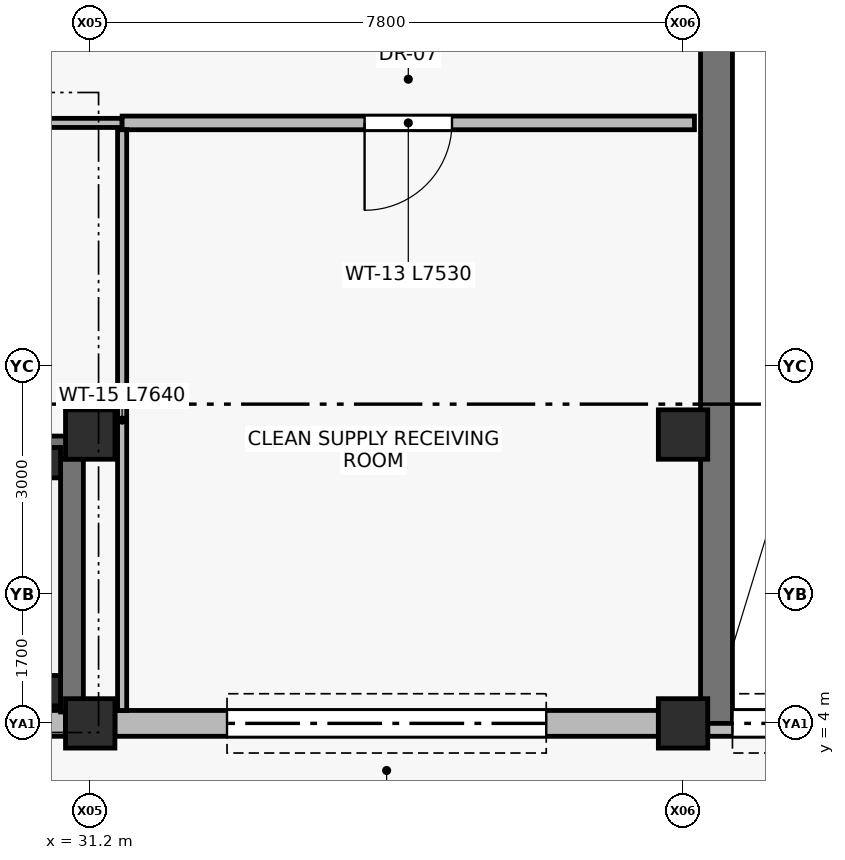
"""IFC4 building model, lengths in metres.
Left out: names, types, materials, properties, quantities, classifications, styles, units other than length and angle.
Written with IfcOpenShell. Run it as: python <this file> out.ifc"""

import sys

from ifc_helpers import new_model, si_unit, direction, frame, frame_2d, origin, origin_2d, place, context, subcontext, project, spatial, rectangle, extrude, element, fill, save


model = new_model("IFC4")
c1 = context("Model", 3, precision=1e-05, world=origin(), true_north=direction((0.0, 1.0)))
c2 = subcontext(c1, "Body", "Model", "MODEL_VIEW")
j1 = project(units=[si_unit("LENGTHUNIT", "METRE"), si_unit("PLANEANGLEUNIT", "RADIAN")], contexts=[c1])
p1 = place(None, origin())
s1 = spatial("IfcSite", under=j1, at=p1, CompositionType="ELEMENT")
p2 = place(p1, origin())
s2 = spatial("IfcBuilding", under=s1, at=p2, CompositionType="ELEMENT")
p3 = place(p2, origin())
s3 = spatial("IfcBuildingStorey", under=s2, at=p3, CompositionType="ELEMENT", Elevation=0.0)
for number, where, z_axis, x_axis in (
    (1, (31.2, 4.0, 0.0), (0.0, 0.0, 1.0), (1.0, 0.0, 0.0)),
    (2, (31.2, 7.8, 0.0), (0.0, 0.0, 1.0), (1.0, 0.0, 0.0)),
    (3, (39.0, 4.0, 0.0), (0.0, 0.0, 1.0), (1.0, 0.0, 0.0)),
    (4, (39.0, 7.8, 0.0), (0.0, 0.0, 1.0), (1.0, 0.0, 0.0)),
):
    element("IfcColumn", number, at=place(p3, frame(where, z_axis=z_axis, x_axis=x_axis)), inside=s3, PredefinedType="COLUMN", context=c2, shape_type="SweptSolid", body=[
        extrude(rectangle(XDim=0.65, YDim=0.65, at=origin_2d()), origin(), (0.0, 0.0, 1.0), 4.8),
    ])
for number, where, z_axis, x_axis in (
    (5, (30.61, 4.43, 0.0), (0.0, 0.0, 1.0), (1.0, 0.0, 0.0)),
    (6, (30.61, 7.43, 0.0), (0.0, 0.0, 1.0), (1.0, 0.0, 0.0)),
):
    element("IfcColumn", number, at=place(p3, frame(where, z_axis=z_axis, x_axis=x_axis)), inside=s3, PredefinedType="COLUMN", context=c2, shape_type="SweptSolid", body=[
        extrude(rectangle(XDim=0.4, YDim=0.4, at=origin_2d()), origin(), (0.0, 0.0, 1.0), 4.8),
    ])
p4 = place(p3, frame((30.875, 4.0, 0.0), z_axis=(0.0, 0.0, 1.0), x_axis=(-1.0, 0.0, 0.0)))
e7 = element("IfcWall", 7, at=p4, inside=s3, PredefinedType="STANDARD", context=c2, shape_type="SweptSolid", body=[
    extrude(rectangle(XDim=7.15, YDim=0.34, at=frame_2d((3.575, 0.0))), origin(), (0.0, 0.0, 1.0), 4.04),
])
p5 = place(p4, frame((5.23, 0.0, 0.0)))
e8 = element("IfcOpeningElement", 8, at=p5, cuts=e7, PredefinedType="OPENING", context=c2, shape_type="SweptSolid", body=[
    extrude(rectangle(XDim=1.8, YDim=2.25, at=frame_2d((0.9, 1.125))), frame((0.0, 0.18, 0.0), z_axis=(0.0, -1.0, 0.0), x_axis=(1.0, 0.0, 0.0)), (0.0, 0.0, 1.0), 0.36),
])
p6 = place(p3, frame((38.675, 4.0, 0.0), z_axis=(0.0, 0.0, 1.0), x_axis=(-1.0, 0.0, 0.0)))
e9 = element("IfcWall", 9, at=p6, inside=s3, PredefinedType="STANDARD", context=c2, shape_type="SweptSolid", body=[
    extrude(rectangle(XDim=7.15, YDim=0.34, at=frame_2d((3.575, 0.0))), origin(), (0.0, 0.0, 1.0), 3.35),
])
p7 = place(p6, frame((1.475, 0.0, 0.0)))
e10 = element("IfcOpeningElement", 10, at=p7, cuts=e9, PredefinedType="OPENING", context=c2, shape_type="SweptSolid", body=[
    extrude(rectangle(XDim=4.2, YDim=3.1, at=frame_2d((2.1, 1.55))), frame((0.0, 0.18, 0.0), z_axis=(0.0, -1.0, 0.0), x_axis=(1.0, 0.0, 0.0)), (0.0, 0.0, 1.0), 0.36),
])
p8 = place(p3, frame((46.475, 4.0, 0.0), z_axis=(0.0, 0.0, 1.0), x_axis=(-1.0, 0.0, 0.0)))
e11 = element("IfcWall", 11, at=p8, inside=s3, PredefinedType="STANDARD", context=c2, shape_type="SweptSolid", body=[
    extrude(rectangle(XDim=7.15, YDim=0.34, at=frame_2d((3.575, 0.0))), origin(), (0.0, 0.0, 1.0), 3.35),
])
p9 = place(p8, frame((0.325, 0.0, 0.0)))
e12 = element("IfcOpeningElement", 12, at=p9, cuts=e11, PredefinedType="OPENING", context=c2, shape_type="SweptSolid", body=[
    extrude(rectangle(XDim=6.5, YDim=3.2, at=frame_2d((3.25, 1.6))), frame((0.0, 0.18, 0.0), z_axis=(0.0, -1.0, 0.0), x_axis=(1.0, 0.0, 0.0)), (0.0, 0.0, 1.0), 0.36),
])
p10 = place(p3, frame((31.11, 7.63, 0.0), z_axis=(0.0, 0.0, 1.0), x_axis=(-1.0, 0.0, 0.0)))
e13 = element("IfcWall", 13, at=p10, inside=s3, PredefinedType="SHEAR", context=c2, shape_type="SweptSolid", body=[
    extrude(rectangle(XDim=7.5, YDim=0.3, at=frame_2d((3.75, 0.0))), origin(), (0.0, 0.0, 1.0), 4.54),
])
p11 = place(p10, frame((5.6, 0.0, 0.0)))
e14 = element("IfcOpeningElement", 14, at=p11, cuts=e13, PredefinedType="OPENING", context=c2, shape_type="SweptSolid", body=[
    extrude(rectangle(XDim=1.4, YDim=2.2, at=frame_2d((0.7, 1.1))), frame((0.0, 0.16, 0.0), z_axis=(0.0, -1.0, 0.0), x_axis=(1.0, 0.0, 0.0)), (0.0, 0.0, 1.0), 0.32),
])
p12 = place(p3, frame((30.96, 4.15, 0.0), z_axis=(0.0, 0.0, 1.0), x_axis=(0.0, 1.0, 0.0)))
e15 = element("IfcWall", 15, at=p12, inside=s3, PredefinedType="SHEAR", context=c2, shape_type="SweptSolid", body=[
    extrude(rectangle(XDim=3.33, YDim=0.3, at=frame_2d((1.665, 0.0))), origin(), (0.0, 0.0, 1.0), 4.54),
])
p13 = place(p3, frame((39.44, 4.0, 0.0), z_axis=(0.0, 0.0, 1.0), x_axis=(0.0, 1.0, 0.0)))
e16 = element("IfcWall", 16, at=p13, inside=s3, PredefinedType="SOLIDWALL", context=c2, shape_type="SweptSolid", body=[
    extrude(rectangle(XDim=22.9, YDim=0.42, at=frame_2d((11.45, 0.0))), origin(), (0.0, 0.0, 1.0), 4.54),
])
p14 = place(p3, frame((31.62, 11.9, 0.0), z_axis=(0.0, 0.0, 1.0), x_axis=(-1.0, 0.0, 0.0)))
e17 = element("IfcWall", 17, at=p14, inside=s3, PredefinedType="PARTITIONING", context=c2, shape_type="SweptSolid", body=[
    extrude(rectangle(XDim=4.95, YDim=0.12, at=frame_2d((2.475, 0.0))), origin(), (0.0, 0.0, 1.0), 4.54),
])
p15 = place(p14, frame((1.925, 0.0, 0.0)))
e18 = element("IfcOpeningElement", 18, at=p15, cuts=e17, PredefinedType="OPENING", context=c2, shape_type="SweptSolid", body=[
    extrude(rectangle(XDim=1.1, YDim=2.15, at=frame_2d((0.55, 1.075))), frame((0.0, 0.07, 0.0), z_axis=(0.0, -1.0, 0.0), x_axis=(1.0, 0.0, 0.0)), (0.0, 0.0, 1.0), 0.14),
])
p16 = place(p3, frame((39.15, 11.9, 0.0), z_axis=(0.0, 0.0, 1.0), x_axis=(-1.0, 0.0, 0.0)))
e19 = element("IfcWall", 19, at=p16, inside=s3, PredefinedType="PARTITIONING", context=c2, shape_type="SweptSolid", body=[
    extrude(rectangle(XDim=7.53, YDim=0.18, at=frame_2d((3.765, 0.0))), origin(), (0.0, 0.0, 1.0), 4.54),
])
p17 = place(p16, frame((3.19, 0.0, 0.0)))
e20 = element("IfcOpeningElement", 20, at=p17, cuts=e19, PredefinedType="OPENING", context=c2, shape_type="SweptSolid", body=[
    extrude(rectangle(XDim=1.15, YDim=2.2, at=frame_2d((0.575, 1.1))), frame((0.0, 0.1, 0.0), z_axis=(0.0, -1.0, 0.0), x_axis=(1.0, 0.0, 0.0)), (0.0, 0.0, 1.0), 0.2),
])
p18 = place(p3, frame((31.62, 4.17, 0.0), z_axis=(0.0, 0.0, 1.0), x_axis=(0.0, 1.0, 0.0)))
e21 = element("IfcWall", 21, at=p18, inside=s3, PredefinedType="PARTITIONING", context=c2, shape_type="SweptSolid", body=[
    extrude(rectangle(XDim=7.64, YDim=0.12, at=frame_2d((3.82, 0.0))), origin(), (0.0, 0.0, 1.0), 4.54),
])
p19 = place(p7, frame((4.2, 0.0, 0.0), z_axis=(0.0, 0.0, 1.0), x_axis=(-1.0, 0.0, 0.0)))
e22 = element("IfcDoor", 22, at=p19, inside=s3, OperationType="ROLLINGUP", PredefinedType="GATE", context=c2, shape_type="SweptSolid", body=[
    extrude(rectangle(XDim=4.2, YDim=3.1, at=frame_2d((2.1, 1.55))), frame((0.0, 0.025, 0.0), z_axis=(0.0, -1.0, 0.0), x_axis=(1.0, 0.0, 0.0)), (0.0, 0.0, 1.0), 0.05),
])
fill(e10, e22)
p20 = place(p9, frame((6.5, 0.0, 0.0), z_axis=(0.0, 0.0, 1.0), x_axis=(-1.0, 0.0, 0.0)))
e23 = element("IfcDoor", 23, at=p20, inside=s3, OperationType="ROLLINGUP", PredefinedType="GATE", context=c2, shape_type="SweptSolid", body=[
    extrude(rectangle(XDim=6.5, YDim=3.2, at=frame_2d((3.25, 1.6))), frame((0.0, 0.025, 0.0), z_axis=(0.0, -1.0, 0.0), x_axis=(1.0, 0.0, 0.0)), (0.0, 0.0, 1.0), 0.05),
])
fill(e12, e23)
p21 = place(p17, origin())
e24 = element("IfcDoor", 24, at=p21, inside=s3, OperationType="SINGLE_SWING_RIGHT", PredefinedType="DOOR", context=c2, shape_type="SweptSolid", body=[
    extrude(rectangle(XDim=1.15, YDim=2.2, at=frame_2d((0.575, 1.1))), frame((0.0, 0.025, 0.0), z_axis=(0.0, -1.0, 0.0), x_axis=(1.0, 0.0, 0.0)), (0.0, 0.0, 1.0), 0.05),
])
fill(e20, e24)
save(model, sys.argv[1])
